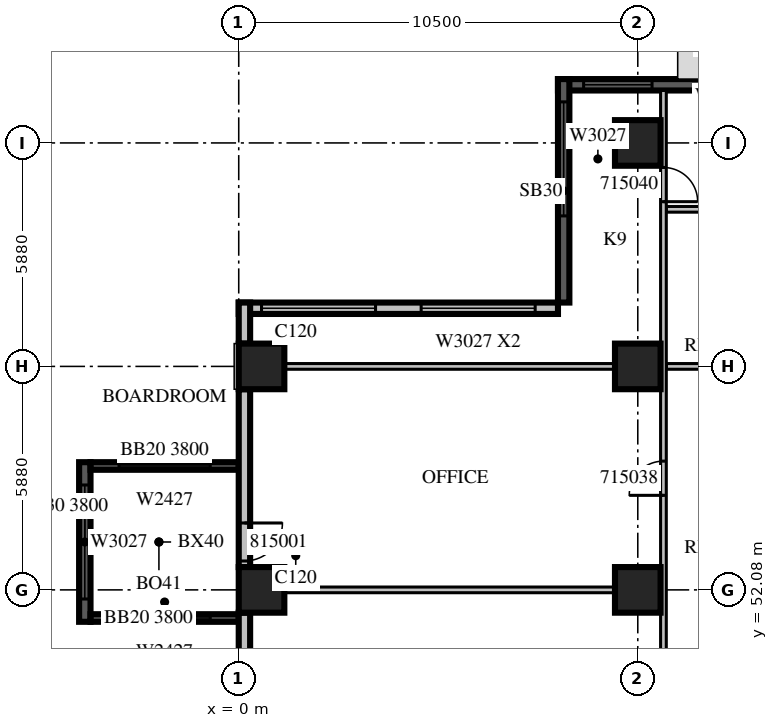
"""IFC4 building model, lengths in metres.
Left out: names, types, materials, properties, quantities, classifications, styles, units other than length and angle.
Written with IfcOpenShell. Run it as: python <this file> out.ifc"""

import sys

from ifc_helpers import new_model, si_unit, direction, frame, frame_2d, origin, origin_2d, place, context, subcontext, project, spatial, rectangle, extrude, source, transform, mapped, element, fill, save


model = new_model("IFC4")
c1 = context("Model", 3, precision=1e-05, world=origin(), true_north=direction((0.0, 1.0)))
c2 = subcontext(c1, "Body", "Model", "MODEL_VIEW")
j1 = project(units=[si_unit("LENGTHUNIT", "METRE"), si_unit("PLANEANGLEUNIT", "RADIAN")], contexts=[c1])
p1 = place(None, origin())
s1 = spatial("IfcSite", under=j1, at=p1, CompositionType="ELEMENT")
p2 = place(p1, origin())
s2 = spatial("IfcBuilding", under=s1, at=p2, CompositionType="ELEMENT")
p3 = place(p2, frame((0.0, 0.0, 74.1)))
s3 = spatial("IfcBuildingStorey", under=s2, at=p3, CompositionType="ELEMENT", Elevation=74.1)
m1 = source(origin(), c2, "Body", "SweptSolid", [
    extrude(rectangle(XDim=1.2, YDim=1.2, at=origin_2d()), origin(), (0.0, 0.0, 1.0), 4.2),
])
for number, where, z_axis, x_axis in (
    (1, (0.6, 52.08, 0.0), (0.0, 0.0, 1.0), (1.0, 0.0, 0.0)),
    (2, (10.5, 52.08, 0.0), (0.0, 0.0, 1.0), (1.0, 0.0, 0.0)),
    (3, (0.6, 57.96, 0.0), (0.0, 0.0, 1.0), (1.0, 0.0, 0.0)),
    (4, (10.5, 57.96, 0.0), (0.0, 0.0, 1.0), (1.0, 0.0, 0.0)),
    (5, (10.5, 63.84, 0.0), (0.0, 0.0, 1.0), (1.0, 0.0, 0.0)),
):
    element("IfcColumn", number, at=place(p3, frame(where, z_axis=z_axis, x_axis=x_axis)), inside=s3, PredefinedType="COLUMN", context=c2, shape_type="MappedRepresentation", body=[
        mapped(m1, transform((0.0, 0.0, 0.0), scale=1.0)),
    ])
m2 = source(origin(), c2, "Body", "SweptSolid", [
    extrude(rectangle(XDim=4.2, YDim=0.3, at=frame_2d((2.1, 0.0))), origin(), (0.0, 0.0, 1.0), 3.8),
])
p4 = place(p3, frame((-4.05, 55.44, 0.0), z_axis=(0.0, 0.0, 1.0), x_axis=(0.0, -1.0, 0.0)))
e6 = element("IfcWall", 6, at=p4, inside=s3, PredefinedType="SOLIDWALL", context=c2, shape_type="MappedRepresentation", body=[
    mapped(m2, transform((0.0, 0.0, 0.0), scale=1.0)),
])
m3 = source(origin(), c2, "Body", "SweptSolid", [
    extrude(rectangle(XDim=3.0, YDim=2.7, at=frame_2d((1.5, 1.35))), frame((0.0, 0.16, 0.0), z_axis=(0.0, -1.0, 0.0), x_axis=(1.0, 0.0, 0.0)), (0.0, 0.0, 1.0), 0.32),
])
p5 = place(p4, frame((0.6, 0.0, 0.6)))
e7 = element("IfcOpeningElement", 7, at=p5, cuts=e6, PredefinedType="OPENING", context=c2, shape_type="MappedRepresentation", body=[
    mapped(m3, transform((0.0, 0.0, 0.0), scale=1.0)),
])
m4 = source(origin(), c2, "Body", "SweptSolid", [
    extrude(rectangle(XDim=3.9, YDim=0.2, at=frame_2d((1.95, 0.0))), origin(), (0.0, 0.0, 1.0), 3.8),
])
p6 = place(p3, frame((0.0, 55.34, 0.0), z_axis=(0.0, 0.0, 1.0), x_axis=(-1.0, 0.0, 0.0)))
e8 = element("IfcWall", 8, at=p6, inside=s3, PredefinedType="SOLIDWALL", context=c2, shape_type="MappedRepresentation", body=[
    mapped(m4, transform((0.0, 0.0, 0.0), scale=1.0)),
])
m5 = source(origin(), c2, "Body", "SweptSolid", [
    extrude(rectangle(XDim=2.4, YDim=2.7, at=frame_2d((1.2, 1.35))), frame((0.0, 0.11, 0.0), z_axis=(0.0, -1.0, 0.0), x_axis=(1.0, 0.0, 0.0)), (0.0, 0.0, 1.0), 0.22),
])
p7 = place(p6, frame((0.75, 0.0, 0.6)))
e9 = element("IfcOpeningElement", 9, at=p7, cuts=e8, PredefinedType="OPENING", context=c2, shape_type="MappedRepresentation", body=[
    mapped(m5, transform((0.0, 0.0, 0.0), scale=1.0)),
])
p8 = place(p3, frame((0.0, 51.34, 0.0), z_axis=(0.0, 0.0, 1.0), x_axis=(-1.0, 0.0, 0.0)))
e10 = element("IfcWall", 10, at=p8, inside=s3, PredefinedType="SOLIDWALL", context=c2, shape_type="MappedRepresentation", body=[
    mapped(m4, transform((0.0, 0.0, 0.0), scale=1.0)),
])
p9 = place(p8, frame((0.75, 0.0, 0.6)))
e11 = element("IfcOpeningElement", 11, at=p9, cuts=e10, PredefinedType="OPENING", context=c2, shape_type="MappedRepresentation", body=[
    mapped(m5, transform((0.0, 0.0, 0.0), scale=1.0)),
])
m6 = source(origin(), c2, "Body", "SweptSolid", [
    extrude(rectangle(XDim=8.4, YDim=0.3, at=frame_2d((4.2, 0.0))), origin(), (0.0, 0.0, 1.0), 3.8),
])
p10 = place(p3, frame((16.8, 65.37, 0.0), z_axis=(0.0, 0.0, 1.0), x_axis=(-1.0, 0.0, 0.0)))
e12 = element("IfcWall", 12, at=p10, inside=s3, PredefinedType="SOLIDWALL", context=c2, shape_type="MappedRepresentation", body=[
    mapped(m6, transform((0.0, 0.0, 0.0), scale=1.0)),
])
m7 = source(origin(), c2, "Body", "SweptSolid", [
    extrude(rectangle(XDim=1.8, YDim=2.7, at=frame_2d((0.9, 1.35))), frame((0.0, 0.16, 0.0), z_axis=(0.0, -1.0, 0.0), x_axis=(1.0, 0.0, 0.0)), (0.0, 0.0, 1.0), 0.32),
])
p11 = place(p10, frame((2.775, 0.0, 0.6)))
e13 = element("IfcOpeningElement", 13, at=p11, cuts=e12, PredefinedType="OPENING", context=c2, shape_type="MappedRepresentation", body=[
    mapped(m7, transform((0.0, 0.0, 0.0), scale=1.0)),
])
p12 = place(p10, frame((5.925, 0.0, 0.6)))
e14 = element("IfcOpeningElement", 14, at=p12, cuts=e12, PredefinedType="OPENING", context=c2, shape_type="MappedRepresentation", body=[
    mapped(m7, transform((0.0, 0.0, 0.0), scale=1.0)),
])
m8 = source(origin(), c2, "Body", "SweptSolid", [
    extrude(rectangle(XDim=5.88, YDim=0.3, at=frame_2d((2.94, 0.0))), origin(), (0.0, 0.0, 1.0), 3.8),
])
p13 = place(p3, frame((8.55, 65.52, 0.0), z_axis=(0.0, 0.0, 1.0), x_axis=(0.0, -1.0, 0.0)))
e15 = element("IfcWall", 15, at=p13, inside=s3, PredefinedType="SOLIDWALL", context=c2, shape_type="MappedRepresentation", body=[
    mapped(m8, transform((0.0, 0.0, 0.0), scale=1.0)),
])
p14 = place(p13, frame((0.6, 0.0, 0.6)))
e16 = element("IfcOpeningElement", 16, at=p14, cuts=e15, PredefinedType="OPENING", context=c2, shape_type="MappedRepresentation", body=[
    mapped(m3, transform((0.0, 0.0, 0.0), scale=1.0)),
])
m9 = source(origin(), c2, "Body", "SweptSolid", [
    extrude(rectangle(XDim=8.4, YDim=0.3, at=frame_2d((4.2, 0.0))), origin(), (0.0, 0.0, 1.0), 3.8),
])
p15 = place(p3, frame((8.4, 59.49, 0.0), z_axis=(0.0, 0.0, 1.0), x_axis=(-1.0, 0.0, 0.0)))
e17 = element("IfcWall", 17, at=p15, inside=s3, PredefinedType="STANDARD", context=c2, shape_type="MappedRepresentation", body=[
    mapped(m9, transform((0.0, 0.0, 0.0), scale=1.0)),
])
p16 = place(p15, frame((0.6, 0.0, 0.6)))
e18 = element("IfcOpeningElement", 18, at=p16, cuts=e17, PredefinedType="OPENING", context=c2, shape_type="MappedRepresentation", body=[
    mapped(m3, transform((0.0, 0.0, 0.0), scale=1.0)),
])
p17 = place(p15, frame((4.8, 0.0, 0.6)))
e19 = element("IfcOpeningElement", 19, at=p17, cuts=e17, PredefinedType="OPENING", context=c2, shape_type="MappedRepresentation", body=[
    mapped(m3, transform((0.0, 0.0, 0.0), scale=1.0)),
])
m10 = source(origin(), c2, "Body", "SweptSolid", [
    extrude(rectangle(XDim=1.08, YDim=0.3, at=frame_2d((0.54, 0.0))), origin(), (0.0, 0.0, 1.0), 3.8),
])
p18 = place(p3, frame((0.15, 59.64, 0.0), z_axis=(0.0, 0.0, 1.0), x_axis=(0.0, -1.0, 0.0)))
e20 = element("IfcWall", 20, at=p18, inside=s3, PredefinedType="STANDARD", context=c2, shape_type="MappedRepresentation", body=[
    mapped(m10, transform((0.0, 0.0, 0.0), scale=1.0)),
])
m11 = source(origin(), c2, "Body", "SweptSolid", [
    extrude(rectangle(XDim=4.68, YDim=0.3, at=frame_2d((2.34, 0.0))), origin(), (0.0, 0.0, 1.0), 3.8),
])
p19 = place(p3, frame((0.15, 57.36, 0.0), z_axis=(0.0, 0.0, 1.0), x_axis=(0.0, -1.0, 0.0)))
e21 = element("IfcWall", 21, at=p19, inside=s3, PredefinedType="STANDARD", context=c2, shape_type="MappedRepresentation", body=[
    mapped(m11, transform((0.0, 0.0, 0.0), scale=1.0)),
])
m12 = source(origin(), c2, "Body", "SweptSolid", [
    extrude(rectangle(XDim=1.0, YDim=2.1, at=frame_2d((0.5, 1.05))), frame((0.0, 0.16, 0.0), z_axis=(0.0, -1.0, 0.0), x_axis=(1.0, 0.0, 0.0)), (0.0, 0.0, 1.0), 0.32),
])
p20 = place(p19, frame((3.52, 0.0, 0.0)))
e22 = element("IfcOpeningElement", 22, at=p20, cuts=e21, PredefinedType="OPENING", context=c2, shape_type="MappedRepresentation", body=[
    mapped(m12, transform((0.0, 0.0, 0.0), scale=1.0)),
])
p21 = place(p3, frame((0.15, 51.48, 0.0), z_axis=(0.0, 0.0, 1.0), x_axis=(0.0, -1.0, 0.0)))
e23 = element("IfcWall", 23, at=p21, inside=s3, PredefinedType="STANDARD", context=c2, shape_type="MappedRepresentation", body=[
    mapped(m11, transform((0.0, 0.0, 0.0), scale=1.0)),
])
m13 = source(origin(), c2, "Body", "SweptSolid", [
    extrude(rectangle(XDim=2.4, YDim=2.7, at=frame_2d((1.2, 1.35))), frame((0.0, 0.16, 0.0), z_axis=(0.0, -1.0, 0.0), x_axis=(1.0, 0.0, 0.0)), (0.0, 0.0, 1.0), 0.32),
])
p22 = place(p21, frame((1.98, 0.0, 0.6)))
e24 = element("IfcOpeningElement", 24, at=p22, cuts=e23, PredefinedType="OPENING", context=c2, shape_type="MappedRepresentation", body=[
    mapped(m13, transform((0.0, 0.0, 0.0), scale=1.0)),
])
m14 = source(origin(), c2, "Body", "SweptSolid", [
    extrude(rectangle(XDim=8.702, YDim=0.15, at=frame_2d((4.351, 0.0))), origin(), (0.0, 0.0, 1.0), 3.8),
])
p23 = place(p3, frame((9.901, 52.08, 0.0), z_axis=(0.0, 0.0, 1.0), x_axis=(-1.0, 0.0, 0.0)))
e25 = element("IfcWall", 25, at=p23, inside=s3, PredefinedType="PARTITIONING", context=c2, shape_type="MappedRepresentation", body=[
    mapped(m14, transform((0.0, 0.0, 0.0), scale=1.0)),
])
m15 = source(origin(), c2, "Body", "SweptSolid", [
    extrude(rectangle(XDim=3.75, YDim=0.15, at=frame_2d((1.875, 0.0))), origin(), (0.0, 0.0, 1.0), 3.8),
])
p24 = place(p3, frame((15.0, 62.093, 0.0), z_axis=(0.0, 0.0, 1.0), x_axis=(-1.0, 0.0, 0.0)))
e26 = element("IfcWall", 26, at=p24, inside=s3, PredefinedType="PARTITIONING", context=c2, shape_type="MappedRepresentation", body=[
    mapped(m15, transform((0.0, 0.0, 0.0), scale=1.0)),
])
p25 = place(p3, frame((9.901, 57.96, 0.0), z_axis=(0.0, 0.0, 1.0), x_axis=(-1.0, 0.0, 0.0)))
e27 = element("IfcWall", 27, at=p25, inside=s3, PredefinedType="PARTITIONING", context=c2, shape_type="MappedRepresentation", body=[
    mapped(m14, transform((0.0, 0.0, 0.0), scale=1.0)),
])
p26 = place(p3, frame((15.0, 57.96, 0.0), z_axis=(0.0, 0.0, 1.0), x_axis=(-1.0, 0.0, 0.0)))
e28 = element("IfcWall", 28, at=p26, inside=s3, PredefinedType="PARTITIONING", context=c2, shape_type="MappedRepresentation", body=[
    mapped(m15, transform((0.0, 0.0, 0.0), scale=1.0)),
])
m16 = source(origin(), c2, "Body", "SweptSolid", [
    extrude(rectangle(XDim=19.02, YDim=0.15, at=frame_2d((9.51, 0.0))), origin(), (0.0, 0.0, 1.0), 3.8),
])
p27 = place(p3, frame((11.175, 46.2, 0.0), z_axis=(0.0, 0.0, 1.0), x_axis=(0.0, 1.0, 0.0)))
e29 = element("IfcWall", 29, at=p27, inside=s3, PredefinedType="PARTITIONING", context=c2, shape_type="MappedRepresentation", body=[
    mapped(m16, transform((0.0, 0.0, 0.0), scale=1.0)),
])
m17 = source(origin(), c2, "Body", "SweptSolid", [
    extrude(rectangle(XDim=0.9, YDim=2.1, at=frame_2d((0.45, 1.05))), frame((0.0, 0.085, 0.0), z_axis=(0.0, -1.0, 0.0), x_axis=(1.0, 0.0, 0.0)), (0.0, 0.0, 1.0), 0.17),
])
p28 = place(p27, frame((2.487, 0.0, 0.0)))
e30 = element("IfcOpeningElement", 30, at=p28, cuts=e29, PredefinedType="OPENING", context=c2, shape_type="MappedRepresentation", body=[
    mapped(m17, transform((0.0, 0.0, 0.0), scale=1.0)),
])
p29 = place(p27, frame((8.367, 0.0, 0.0)))
e31 = element("IfcOpeningElement", 31, at=p29, cuts=e29, PredefinedType="OPENING", context=c2, shape_type="MappedRepresentation", body=[
    mapped(m17, transform((0.0, 0.0, 0.0), scale=1.0)),
])
p30 = place(p27, frame((16.094, 0.0, 0.0)))
e32 = element("IfcOpeningElement", 32, at=p30, cuts=e29, PredefinedType="OPENING", context=c2, shape_type="MappedRepresentation", body=[
    mapped(m17, transform((0.0, 0.0, 0.0), scale=1.0)),
])
m18 = source(origin(), c2, "Body", "SweptSolid", [
    extrude(rectangle(XDim=3.0, YDim=2.7, at=frame_2d((1.5, 1.35))), frame((0.0, 0.03, 0.0), z_axis=(0.0, -1.0, 0.0), x_axis=(1.0, 0.0, 0.0)), (0.0, 0.0, 1.0), 0.06),
])
p31 = place(p5, origin())
e33 = element("IfcWindow", 33, at=p31, inside=s3, PartitioningType="SINGLE_PANEL", PredefinedType="WINDOW", context=c2, shape_type="MappedRepresentation", body=[
    mapped(m18, transform((0.0, 0.0, 0.0), scale=1.0)),
])
fill(e7, e33)
m19 = source(origin(), c2, "Body", "SweptSolid", [
    extrude(rectangle(XDim=2.4, YDim=2.7, at=frame_2d((1.2, 1.35))), frame((0.0, 0.03, 0.0), z_axis=(0.0, -1.0, 0.0), x_axis=(1.0, 0.0, 0.0)), (0.0, 0.0, 1.0), 0.06),
])
p32 = place(p7, origin())
e34 = element("IfcWindow", 34, at=p32, inside=s3, PartitioningType="SINGLE_PANEL", PredefinedType="WINDOW", context=c2, shape_type="MappedRepresentation", body=[
    mapped(m19, transform((0.0, 0.0, 0.0), scale=1.0)),
])
fill(e9, e34)
p33 = place(p9, origin())
e35 = element("IfcWindow", 35, at=p33, inside=s3, PartitioningType="SINGLE_PANEL", PredefinedType="WINDOW", context=c2, shape_type="MappedRepresentation", body=[
    mapped(m19, transform((0.0, 0.0, 0.0), scale=1.0)),
])
fill(e11, e35)
m20 = source(origin(), c2, "Body", "SweptSolid", [
    extrude(rectangle(XDim=1.8, YDim=2.7, at=frame_2d((0.9, 1.35))), frame((0.0, 0.03, 0.0), z_axis=(0.0, -1.0, 0.0), x_axis=(1.0, 0.0, 0.0)), (0.0, 0.0, 1.0), 0.06),
])
p34 = place(p12, origin())
e36 = element("IfcWindow", 36, at=p34, inside=s3, PartitioningType="SINGLE_PANEL", PredefinedType="WINDOW", context=c2, shape_type="MappedRepresentation", body=[
    mapped(m20, transform((0.0, 0.0, 0.0), scale=1.0)),
])
fill(e14, e36)
p35 = place(p14, origin())
e37 = element("IfcWindow", 37, at=p35, inside=s3, PartitioningType="SINGLE_PANEL", PredefinedType="WINDOW", context=c2, shape_type="MappedRepresentation", body=[
    mapped(m18, transform((0.0, 0.0, 0.0), scale=1.0)),
])
fill(e16, e37)
p36 = place(p16, origin())
e38 = element("IfcWindow", 38, at=p36, inside=s3, PartitioningType="SINGLE_PANEL", PredefinedType="WINDOW", context=c2, shape_type="MappedRepresentation", body=[
    mapped(m18, transform((0.0, 0.0, 0.0), scale=1.0)),
])
fill(e18, e38)
p37 = place(p17, origin())
e39 = element("IfcWindow", 39, at=p37, inside=s3, PartitioningType="SINGLE_PANEL", PredefinedType="WINDOW", context=c2, shape_type="MappedRepresentation", body=[
    mapped(m18, transform((0.0, 0.0, 0.0), scale=1.0)),
])
fill(e19, e39)
m21 = source(origin(), c2, "Body", "SweptSolid", [
    extrude(rectangle(XDim=0.9, YDim=2.1, at=frame_2d((0.45, 1.05))), frame((0.0, 0.025, 0.0), z_axis=(0.0, -1.0, 0.0), x_axis=(1.0, 0.0, 0.0)), (0.0, 0.0, 1.0), 0.05),
])
p38 = place(p29, origin())
e40 = element("IfcDoor", 40, at=p38, inside=s3, OperationType="SINGLE_SWING_LEFT", PredefinedType="DOOR", context=c2, shape_type="MappedRepresentation", body=[
    mapped(m21, transform((0.0, 0.0, 0.0), scale=1.0)),
])
fill(e31, e40)
p39 = place(p30, origin())
e41 = element("IfcDoor", 41, at=p39, inside=s3, OperationType="SINGLE_SWING_RIGHT", PredefinedType="DOOR", context=c2, shape_type="MappedRepresentation", body=[
    mapped(m21, transform((0.0, 0.0, 0.0), scale=1.0)),
])
fill(e32, e41)
m22 = source(origin(), c2, "Body", "SweptSolid", [
    extrude(rectangle(XDim=1.0, YDim=2.1, at=frame_2d((0.5, 1.05))), frame((0.0, 0.025, 0.0), z_axis=(0.0, -1.0, 0.0), x_axis=(1.0, 0.0, 0.0)), (0.0, 0.0, 1.0), 0.05),
])
p40 = place(p20, origin())
e42 = element("IfcDoor", 42, at=p40, inside=s3, OperationType="SINGLE_SWING_LEFT", PredefinedType="DOOR", context=c2, shape_type="MappedRepresentation", body=[
    mapped(m22, transform((0.0, 0.0, 0.0), scale=1.0)),
])
fill(e22, e42)
save(model, sys.argv[1])
